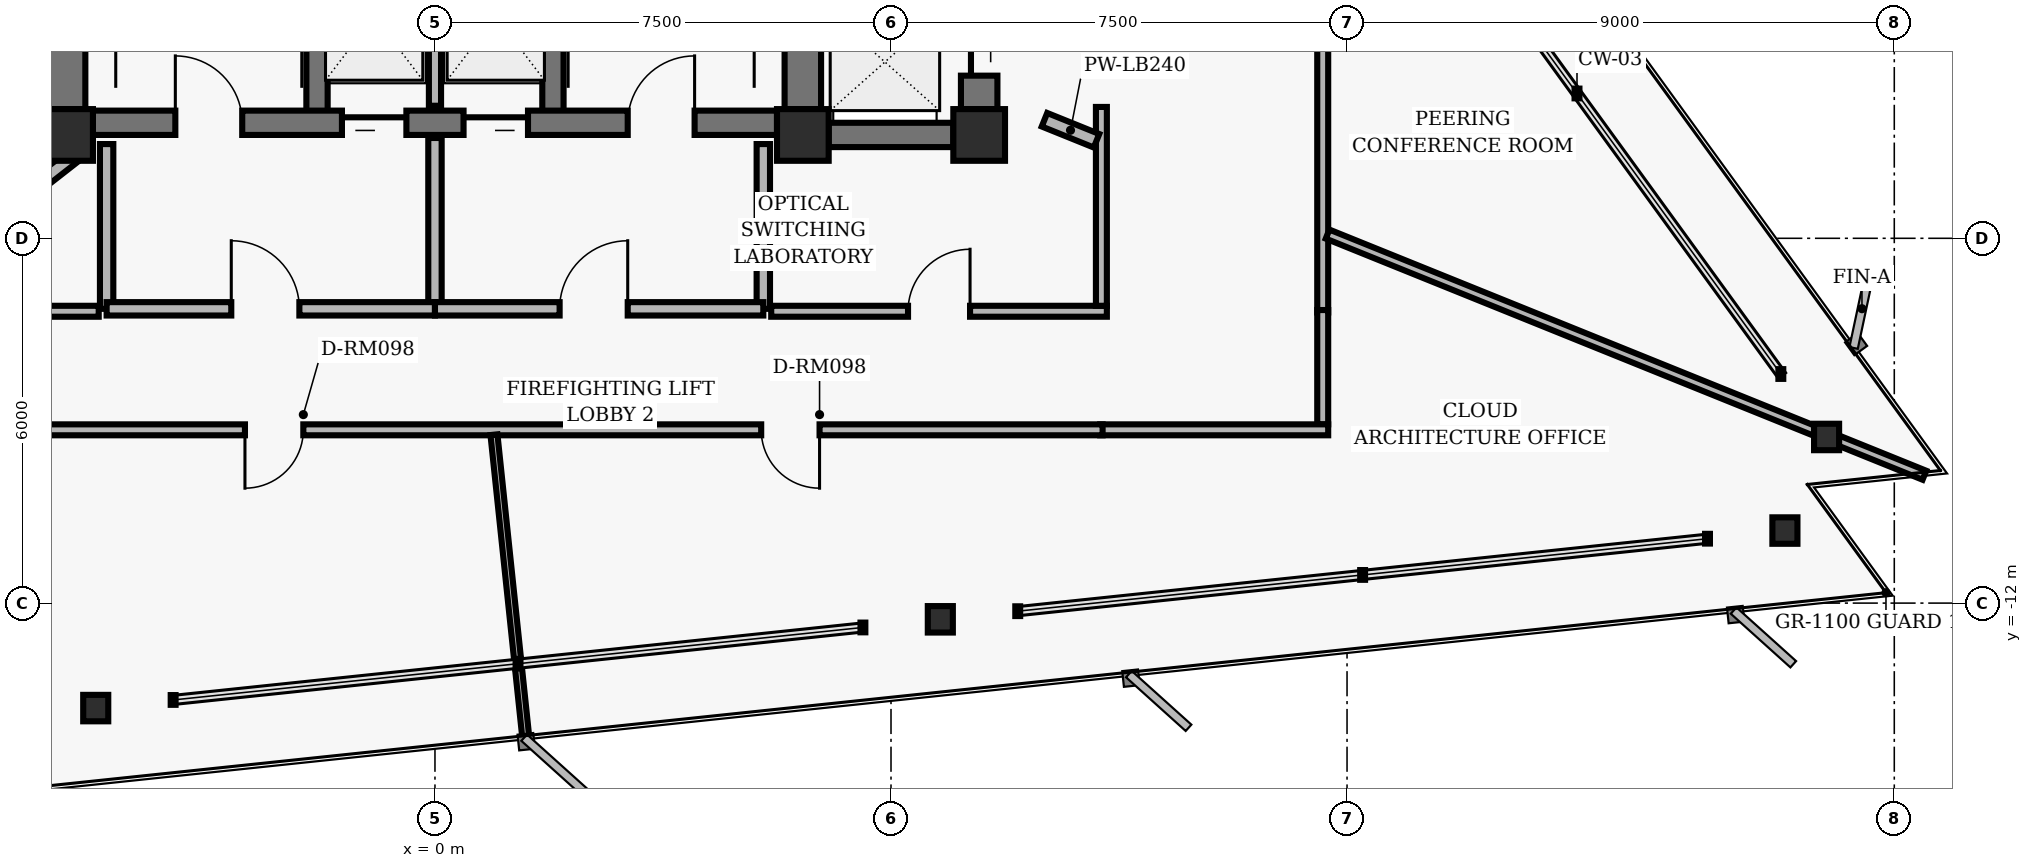
"""IFC4 building model, lengths in metres.
Left out: names, types, materials, properties, quantities, classifications, styles, units other than length and angle.
Written with IfcOpenShell. Run it as: python <this file> out.ifc"""

import sys

from ifc_helpers import new_model, si_unit, direction, frame, frame_2d, origin, origin_2d, place, context, subcontext, project, spatial, rectangle, hollow_rectangle, i_section, extrude, element, fill, save


model = new_model("IFC4")
c1 = context("Model", 3, precision=1e-05, world=origin(), true_north=direction((0.0, 1.0)))
c2 = subcontext(c1, "Body", "Model", "MODEL_VIEW")
j1 = project(units=[si_unit("LENGTHUNIT", "METRE"), si_unit("PLANEANGLEUNIT", "RADIAN")], contexts=[c1])
p1 = place(None, origin())
s1 = spatial("IfcSite", under=j1, at=p1, CompositionType="ELEMENT")
p2 = place(p1, origin())
s2 = spatial("IfcBuilding", under=s1, at=p2, CompositionType="ELEMENT")
p3 = place(p2, frame((0.0, 0.0, 107.68)))
s3 = spatial("IfcBuildingStorey", under=s2, at=p3, CompositionType="ELEMENT", Elevation=107.68)
for number, where, z_axis, x_axis in (
    (1, (-6.05, -4.3, 0.0), (0.0, 0.0, 1.0), (1.0, 0.0, 0.0)),
    (2, (6.05, -4.3, 0.0), (0.0, 0.0, 1.0), (1.0, 0.0, 0.0)),
    (3, (8.95, -4.3, 0.0), (0.0, 0.0, 1.0), (1.0, 0.0, 0.0)),
):
    element("IfcColumn", number, at=place(p3, frame(where, z_axis=z_axis, x_axis=x_axis)), inside=s3, PredefinedType="COLUMN", context=c2, shape_type="SweptSolid", body=[
        extrude(hollow_rectangle(XDim=0.85, YDim=0.85, WallThickness=0.055, InnerFilletRadius=0.02, OuterFilletRadius=0.04, at=origin_2d()), origin(), (0.0, 0.0, 1.0), 3.04),
    ])
for number, where, z_axis, x_axis in (
    (4, (-6.05, -3.875, 0.0), (0.0, 0.0, 1.0), (0.0, 1.0, 0.0)),
    (5, (6.05, -3.875, 0.0), (0.0, 0.0, 1.0), (0.0, 1.0, 0.0)),
):
    element("IfcWall", number, at=place(p3, frame(where, z_axis=z_axis, x_axis=x_axis)), inside=s3, PredefinedType="SHEAR", context=c2, shape_type="SweptSolid", body=[
        extrude(rectangle(XDim=3.45, YDim=0.6, at=frame_2d((1.725, 0.0))), origin(), (0.0, 0.0, 1.0), 2.788),
    ])
for number, where, z_axis, x_axis in (
    (6, (-1.94, -4.1, 0.0), (0.0, 0.0, 1.0), (0.0, 1.0, 0.0)),
    (7, (1.94, -4.1, 0.0), (0.0, 0.0, 1.0), (0.0, 1.0, 0.0)),
):
    element("IfcWall", number, at=place(p3, frame(where, z_axis=z_axis, x_axis=x_axis)), inside=s3, PredefinedType="SHEAR", context=c2, shape_type="SweptSolid", body=[
        extrude(rectangle(XDim=8.2, YDim=0.35, at=frame_2d((4.1, 0.0))), origin(), (0.0, 0.0, 1.0), 2.788),
    ])
p4 = place(p3, frame((-5.625, -4.1, 0.0), z_axis=(0.0, 0.0, 1.0), x_axis=(1.0, 0.0, 0.0)))
e8 = element("IfcWall", 8, at=p4, inside=s3, PredefinedType="SHEAR", context=c2, shape_type="SweptSolid", body=[
    extrude(rectangle(XDim=11.25, YDim=0.4, at=frame_2d((5.625, 0.0))), origin(), (0.0, 0.0, 1.0), 2.788),
])
p5 = place(p4, frame((1.355, 0.0, 0.0)))
e9 = element("IfcOpeningElement", 9, at=p5, cuts=e8, PredefinedType="OPENING", context=c2, shape_type="SweptSolid", body=[
    extrude(rectangle(XDim=1.1, YDim=2.04, at=frame_2d((0.55, 1.02))), frame((0.0, 0.21, 0.0), z_axis=(0.0, -1.0, 0.0), x_axis=(1.0, 0.0, 0.0)), (0.0, 0.0, 1.0), 0.42),
])
p6 = place(p4, frame((8.795, 0.0, 0.0)))
e10 = element("IfcOpeningElement", 10, at=p6, cuts=e8, PredefinedType="OPENING", context=c2, shape_type="SweptSolid", body=[
    extrude(rectangle(XDim=1.1, YDim=2.04, at=frame_2d((0.55, 1.02))), frame((0.0, 0.21, 0.0), z_axis=(0.0, -1.0, 0.0), x_axis=(1.0, 0.0, 0.0)), (0.0, 0.0, 1.0), 0.42),
])
p7 = place(p4, frame((4.095, 0.0, 0.0)))
e11 = element("IfcOpeningElement", 11, at=p7, cuts=e8, PredefinedType="OPENING", context=c2, shape_type="SweptSolid", body=[
    extrude(rectangle(XDim=1.06, YDim=2.04, at=frame_2d((0.53, 1.02))), frame((0.0, 0.21, 0.0), z_axis=(0.0, -1.0, 0.0), x_axis=(1.0, 0.0, 0.0)), (0.0, 0.0, 1.0), 0.42),
])
p8 = place(p4, frame((6.095, 0.0, 0.0)))
e12 = element("IfcOpeningElement", 12, at=p8, cuts=e8, PredefinedType="OPENING", context=c2, shape_type="SweptSolid", body=[
    extrude(rectangle(XDim=1.06, YDim=2.04, at=frame_2d((0.53, 1.02))), frame((0.0, 0.21, 0.0), z_axis=(0.0, -1.0, 0.0), x_axis=(1.0, 0.0, 0.0)), (0.0, 0.0, 1.0), 0.42),
])
p9 = place(p3, frame((8.95, -3.875, 0.0), z_axis=(0.0, 0.0, 1.0), x_axis=(0.0, 1.0, 0.0)))
e13 = element("IfcWall", 13, at=p9, inside=s3, PredefinedType="SHEAR", context=c2, shape_type="SweptSolid", body=[
    extrude(rectangle(XDim=7.95, YDim=0.6, at=frame_2d((3.975, 0.0))), origin(), (0.0, 0.0, 1.0), 2.788),
])
p10 = place(p9, frame((0.55, 0.0, 0.0)))
e14 = element("IfcOpeningElement", 14, at=p10, cuts=e13, PredefinedType="OPENING", context=c2, shape_type="SweptSolid", body=[
    extrude(rectangle(XDim=1.06, YDim=2.04, at=frame_2d((0.53, 1.02))), frame((0.0, 0.31, 0.0), z_axis=(0.0, -1.0, 0.0), x_axis=(1.0, 0.0, 0.0)), (0.0, 0.0, 1.0), 0.62),
])
p11 = place(p9, frame((3.445, 0.0, 0.0)))
e15 = element("IfcOpeningElement", 15, at=p11, cuts=e13, PredefinedType="OPENING", context=c2, shape_type="SweptSolid", body=[
    extrude(rectangle(XDim=1.06, YDim=2.04, at=frame_2d((0.53, 1.02))), frame((0.0, 0.31, 0.0), z_axis=(0.0, -1.0, 0.0), x_axis=(1.0, 0.0, 0.0)), (0.0, 0.0, 1.0), 0.62),
])
p12 = place(p9, frame((6.33, 0.0, 0.0)))
e16 = element("IfcOpeningElement", 16, at=p12, cuts=e13, PredefinedType="OPENING", context=c2, shape_type="SweptSolid", body=[
    extrude(rectangle(XDim=1.06, YDim=2.04, at=frame_2d((0.53, 1.02))), frame((0.0, 0.31, 0.0), z_axis=(0.0, -1.0, 0.0), x_axis=(1.0, 0.0, 0.0)), (0.0, 0.0, 1.0), 0.62),
])
p13 = place(p3, frame((6.475, -4.3, 0.0), z_axis=(0.0, 0.0, 1.0), x_axis=(1.0, 0.0, 0.0)))
e17 = element("IfcWall", 17, at=p13, inside=s3, PredefinedType="SHEAR", context=c2, shape_type="SweptSolid", body=[
    extrude(rectangle(XDim=2.05, YDim=0.4, at=frame_2d((1.025, 0.0))), origin(), (0.0, 0.0, 1.0), 2.788),
])
for number, where, z_axis, x_axis in (
    (18, (22.887, -9.268, 0.0), (0.0, 0.0, 1.0), (1.0, 0.0, 0.0)),
    (19, (-5.579, -13.727, 0.0), (0.0, 0.0, 1.0), (1.0, 0.0, 0.0)),
    (20, (8.311, -12.267, 0.0), (0.0, 0.0, 1.0), (1.0, 0.0, 0.0)),
    (21, (22.201, -10.807, 0.0), (0.0, 0.0, 1.0), (1.0, 0.0, 0.0)),
):
    element("IfcColumn", number, at=place(p3, frame(where, z_axis=z_axis, x_axis=x_axis)), inside=s3, PredefinedType="COLUMN", context=c2, shape_type="SweptSolid", body=[
        extrude(i_section(OverallWidth=0.412, OverallDepth=0.435, WebThickness=0.036, FlangeThickness=0.057, FilletRadius=0.022, at=origin_2d()), origin(), (0.0, 0.0, 1.0), 3.04),
    ])
p14 = place(p3, frame((0.0, -3.82, 0.0), z_axis=(0.0, 0.0, 1.0), x_axis=(0.0, 1.0, 0.0)))
e22 = element("IfcWall", 22, at=p14, inside=s3, PredefinedType="PARTITIONING", context=c2, shape_type="SweptSolid", body=[
    extrude(rectangle(XDim=2.67, YDim=0.2, at=frame_2d((1.335, 0.0))), origin(), (0.0, 0.0, 1.0), 2.763),
])
for number, where, z_axis, x_axis in (
    (23, (-5.4, -7.16, 0.0), (0.0, 0.0, 1.0), (0.0, 1.0, 0.0)),
    (24, (5.4, -7.16, 0.0), (0.0, 0.0, 1.0), (0.0, 1.0, 0.0)),
):
    element("IfcWall", number, at=place(p3, frame(where, z_axis=z_axis, x_axis=x_axis)), inside=s3, PredefinedType="PARTITIONING", context=c2, shape_type="SweptSolid", body=[
        extrude(rectangle(XDim=2.71, YDim=0.22, at=frame_2d((1.355, 0.0))), origin(), (0.0, 0.0, 1.0), 2.763),
    ])
p15 = place(p3, frame((0.0, -7.16, 0.0), z_axis=(0.0, 0.0, 1.0), x_axis=(0.0, 1.0, 0.0)))
e25 = element("IfcWall", 25, at=p15, inside=s3, PredefinedType="PARTITIONING", context=c2, shape_type="SweptSolid", body=[
    extrude(rectangle(XDim=2.81, YDim=0.22, at=frame_2d((1.405, 0.0))), origin(), (0.0, 0.0, 1.0), 2.763),
])
p16 = place(p3, frame((-5.4, -7.16, 0.0), z_axis=(0.0, 0.0, 1.0), x_axis=(1.0, 0.0, 0.0)))
e26 = element("IfcWall", 26, at=p16, inside=s3, PredefinedType="PARTITIONING", context=c2, shape_type="SweptSolid", body=[
    extrude(rectangle(XDim=5.4, YDim=0.22, at=frame_2d((2.7, 0.0))), origin(), (0.0, 0.0, 1.0), 2.33),
])
p17 = place(p16, frame((2.05, 0.0, 0.0)))
e27 = element("IfcOpeningElement", 27, at=p17, cuts=e26, PredefinedType="OPENING", context=c2, shape_type="SweptSolid", body=[
    extrude(rectangle(XDim=1.12, YDim=2.02, at=frame_2d((0.56, 1.01))), frame((0.0, 0.12, 0.0), z_axis=(0.0, -1.0, 0.0), x_axis=(1.0, 0.0, 0.0)), (0.0, 0.0, 1.0), 0.24),
])
p18 = place(p3, frame((0.0, -7.16, 0.0), z_axis=(0.0, 0.0, 1.0), x_axis=(1.0, 0.0, 0.0)))
e28 = element("IfcWall", 28, at=p18, inside=s3, PredefinedType="PARTITIONING", context=c2, shape_type="SweptSolid", body=[
    extrude(rectangle(XDim=5.4, YDim=0.22, at=frame_2d((2.7, 0.0))), origin(), (0.0, 0.0, 1.0), 2.33),
])
p19 = place(p18, frame((2.05, 0.0, 0.0)))
e29 = element("IfcOpeningElement", 29, at=p19, cuts=e28, PredefinedType="OPENING", context=c2, shape_type="SweptSolid", body=[
    extrude(rectangle(XDim=1.12, YDim=2.02, at=frame_2d((0.56, 1.01))), frame((0.0, 0.12, 0.0), z_axis=(0.0, -1.0, 0.0), x_axis=(1.0, 0.0, 0.0)), (0.0, 0.0, 1.0), 0.24),
])
p20 = place(p3, frame((14.6, 3.018, 0.0), z_axis=(0.0, 0.0, 1.0), x_axis=(0.0, -1.0, 0.0)))
e30 = element("IfcWall", 30, at=p20, inside=s3, PredefinedType="PARTITIONING", context=c2, shape_type="SweptSolid", body=[
    extrude(rectangle(XDim=10.238, YDim=0.18, at=frame_2d((5.119, 0.0))), origin(), (0.0, 0.0, 1.0), 2.763),
])
p21 = place(p20, frame((4.124, 0.0, 0.0)))
e31 = element("IfcOpeningElement", 31, at=p21, cuts=e30, PredefinedType="OPENING", context=c2, shape_type="SweptSolid", body=[
    extrude(rectangle(XDim=0.96, YDim=2.02, at=frame_2d((0.48, 1.01))), frame((0.0, 0.1, 0.0), z_axis=(0.0, -1.0, 0.0), x_axis=(1.0, 0.0, 0.0)), (0.0, 0.0, 1.0), 0.2),
])
p22 = place(p3, frame((14.6, -7.18, 0.0), z_axis=(0.0, 0.0, 1.0), x_axis=(0.0, -1.0, 0.0)))
e32 = element("IfcWall", 32, at=p22, inside=s3, PredefinedType="PARTITIONING", context=c2, shape_type="SweptSolid", body=[
    extrude(rectangle(XDim=1.88, YDim=0.18, at=frame_2d((0.94, 0.0))), origin(), (0.0, 0.0, 1.0), 2.763),
])
p23 = place(p3, frame((14.69, -9.15, 0.0), z_axis=(0.0, 0.0, 1.0), x_axis=(-1.0, 0.0, 0.0)))
e33 = element("IfcWall", 33, at=p23, inside=s3, PredefinedType="PARTITIONING", context=c2, shape_type="SweptSolid", body=[
    extrude(rectangle(XDim=3.75, YDim=0.18, at=frame_2d((1.875, 0.0))), origin(), (0.0, 0.0, 1.0), 2.33),
])
p24 = place(p3, frame((10.98, -9.15, 0.0), z_axis=(0.0, 0.0, 1.0), x_axis=(-1.0, 0.0, 0.0)))
e34 = element("IfcWall", 34, at=p24, inside=s3, PredefinedType="PARTITIONING", context=c2, shape_type="SweptSolid", body=[
    extrude(rectangle(XDim=17.5, YDim=0.18, at=frame_2d((8.75, 0.0))), origin(), (0.0, 0.0, 1.0), 2.33),
])
p25 = place(p24, frame((13.145, 0.0, 0.0)))
e35 = element("IfcOpeningElement", 35, at=p25, cuts=e34, PredefinedType="OPENING", context=c2, shape_type="SweptSolid", body=[
    extrude(rectangle(XDim=0.96, YDim=2.02, at=frame_2d((0.48, 1.01))), frame((0.0, 0.1, 0.0), z_axis=(0.0, -1.0, 0.0), x_axis=(1.0, 0.0, 0.0)), (0.0, 0.0, 1.0), 0.2),
])
p26 = place(p24, frame((4.655, 0.0, 0.0)))
e36 = element("IfcOpeningElement", 36, at=p26, cuts=e34, PredefinedType="OPENING", context=c2, shape_type="SweptSolid", body=[
    extrude(rectangle(XDim=0.96, YDim=2.02, at=frame_2d((0.48, 1.01))), frame((0.0, 0.1, 0.0), z_axis=(0.0, -1.0, 0.0), x_axis=(1.0, 0.0, 0.0)), (0.0, 0.0, 1.0), 0.2),
])
p27 = place(p3, frame((5.53, -7.2, 0.0), z_axis=(0.0, 0.0, 1.0), x_axis=(1.0, 0.0, 0.0)))
e37 = element("IfcWall", 37, at=p27, inside=s3, PredefinedType="PARTITIONING", context=c2, shape_type="SweptSolid", body=[
    extrude(rectangle(XDim=5.52, YDim=0.18, at=frame_2d((2.76, 0.0))), origin(), (0.0, 0.0, 1.0), 2.33),
])
p28 = place(p27, frame((2.25, 0.0, 0.0)))
e38 = element("IfcOpeningElement", 38, at=p28, cuts=e37, PredefinedType="OPENING", context=c2, shape_type="SweptSolid", body=[
    extrude(rectangle(XDim=1.02, YDim=2.02, at=frame_2d((0.51, 1.01))), frame((0.0, 0.1, 0.0), z_axis=(0.0, -1.0, 0.0), x_axis=(1.0, 0.0, 0.0)), (0.0, 0.0, 1.0), 0.2),
])
p29 = place(p3, frame((10.96, -7.11, 0.0), z_axis=(0.0, 0.0, 1.0), x_axis=(0.0, 1.0, 0.0)))
e39 = element("IfcWall", 39, at=p29, inside=s3, PredefinedType="PARTITIONING", context=c2, shape_type="SweptSolid", body=[
    extrude(rectangle(XDim=3.271, YDim=0.18, at=frame_2d((1.635, 0.0))), origin(), (0.0, 0.0, 1.0), 2.763),
])
p30 = place(p3, frame((-6.59, -7.2, 0.0), z_axis=(0.0, 0.0, 1.0), x_axis=(1.0, 0.0, 0.0)))
e40 = element("IfcWall", 40, at=p30, inside=s3, PredefinedType="PARTITIONING", context=c2, shape_type="SweptSolid", body=[
    extrude(rectangle(XDim=1.06, YDim=0.18, at=frame_2d((0.53, 0.0))), origin(), (0.0, 0.0, 1.0), 2.33),
])
p31 = place(p3, frame((-5.836, -4.56, 0.0), z_axis=(0.0, 0.0, 1.0), x_axis=(-0.788054366409, -0.615605649408, 0.0)))
e41 = element("IfcWall", 41, at=p31, inside=s3, PredefinedType="PARTITIONING", context=c2, shape_type="SweptSolid", body=[
    extrude(rectangle(XDim=0.74, YDim=0.24, at=frame_2d((0.37, 0.0))), origin(), (0.0, 0.0, 1.0), 2.132),
])
p32 = place(p3, frame((0.97, -9.23, 0.0), z_axis=(0.0, 0.0, 1.0), x_axis=(0.104502779655, -0.994524594489, 0.0)))
e42 = element("IfcWall", 42, at=p32, inside=s3, PredefinedType="MOVABLE", context=c2, shape_type="SweptSolid", body=[
    extrude(rectangle(XDim=5.028, YDim=0.115, at=frame_2d((2.514, 0.0))), origin(), (0.0, 0.0, 1.0), 2.763),
])
p33 = place(p3, frame((10.024, -4.05, 0.0), z_axis=(0.0, 0.0, 1.0), x_axis=(0.927194137639, -0.374581140912, 0.0)))
e43 = element("IfcWall", 43, at=p33, inside=s3, PredefinedType="PARTITIONING", context=c2, shape_type="SweptSolid", body=[
    extrude(rectangle(XDim=0.923, YDim=0.24, at=frame_2d((0.461, 0.0))), origin(), (0.0, 0.0, 1.0), 2.763),
])
p34 = place(p3, frame((14.68, -5.931, 0.0), z_axis=(0.0, 0.0, 1.0), x_axis=(0.927187622353, -0.374597267682, 0.0)))
e44 = element("IfcWall", 44, at=p34, inside=s3, PredefinedType="PARTITIONING", context=c2, shape_type="SweptSolid", body=[
    extrude(rectangle(XDim=10.586, YDim=0.16, at=frame_2d((5.293, 0.0))), origin(), (0.0, 0.0, 1.0), 2.132),
])
p35 = place(p5, origin())
e45 = element("IfcDoor", 45, at=p35, inside=s3, OperationType="SINGLE_SWING_LEFT", PredefinedType="DOOR", context=c2, shape_type="SweptSolid", body=[
    extrude(rectangle(XDim=1.1, YDim=2.04, at=frame_2d((0.55, 1.02))), frame((0.0, 0.025, 0.0), z_axis=(0.0, -1.0, 0.0), x_axis=(1.0, 0.0, 0.0)), (0.0, 0.0, 1.0), 0.05),
])
fill(e9, e45)
p36 = place(p6, origin())
e46 = element("IfcDoor", 46, at=p36, inside=s3, OperationType="SINGLE_SWING_RIGHT", PredefinedType="DOOR", context=c2, shape_type="SweptSolid", body=[
    extrude(rectangle(XDim=1.1, YDim=2.04, at=frame_2d((0.55, 1.02))), frame((0.0, 0.025, 0.0), z_axis=(0.0, -1.0, 0.0), x_axis=(1.0, 0.0, 0.0)), (0.0, 0.0, 1.0), 0.05),
])
fill(e10, e46)
p37 = place(p7, origin())
e47 = element("IfcDoor", 47, at=p37, inside=s3, OperationType="SLIDING_TO_LEFT", PredefinedType="DOOR", context=c2, shape_type="SweptSolid", body=[
    extrude(rectangle(XDim=1.06, YDim=2.04, at=frame_2d((0.53, 1.02))), frame((0.0, 0.025, 0.0), z_axis=(0.0, -1.0, 0.0), x_axis=(1.0, 0.0, 0.0)), (0.0, 0.0, 1.0), 0.05),
])
fill(e11, e47)
p38 = place(p8, origin())
e48 = element("IfcDoor", 48, at=p38, inside=s3, OperationType="SLIDING_TO_RIGHT", PredefinedType="DOOR", context=c2, shape_type="SweptSolid", body=[
    extrude(rectangle(XDim=1.06, YDim=2.04, at=frame_2d((0.53, 1.02))), frame((0.0, 0.025, 0.0), z_axis=(0.0, -1.0, 0.0), x_axis=(1.0, 0.0, 0.0)), (0.0, 0.0, 1.0), 0.05),
])
fill(e12, e48)
p39 = place(p17, origin())
e49 = element("IfcDoor", 49, at=p39, inside=s3, OperationType="SINGLE_SWING_LEFT", PredefinedType="DOOR", context=c2, shape_type="SweptSolid", body=[
    extrude(rectangle(XDim=1.12, YDim=2.02, at=frame_2d((0.56, 1.01))), frame((0.0, 0.025, 0.0), z_axis=(0.0, -1.0, 0.0), x_axis=(1.0, 0.0, 0.0)), (0.0, 0.0, 1.0), 0.05),
])
fill(e27, e49)
p40 = place(p19, origin())
e50 = element("IfcDoor", 50, at=p40, inside=s3, OperationType="SINGLE_SWING_RIGHT", PredefinedType="DOOR", context=c2, shape_type="SweptSolid", body=[
    extrude(rectangle(XDim=1.12, YDim=2.02, at=frame_2d((0.56, 1.01))), frame((0.0, 0.025, 0.0), z_axis=(0.0, -1.0, 0.0), x_axis=(1.0, 0.0, 0.0)), (0.0, 0.0, 1.0), 0.05),
])
fill(e29, e50)
p41 = place(p10, origin())
e51 = element("IfcDoor", 51, at=p41, inside=s3, OperationType="SLIDING_TO_LEFT", PredefinedType="DOOR", context=c2, shape_type="SweptSolid", body=[
    extrude(rectangle(XDim=1.06, YDim=2.04, at=frame_2d((0.53, 1.02))), frame((0.0, 0.025, 0.0), z_axis=(0.0, -1.0, 0.0), x_axis=(1.0, 0.0, 0.0)), (0.0, 0.0, 1.0), 0.05),
])
fill(e14, e51)
p42 = place(p25, origin())
e52 = element("IfcDoor", 52, at=p42, inside=s3, OperationType="SINGLE_SWING_RIGHT", PredefinedType="DOOR", context=c2, shape_type="SweptSolid", body=[
    extrude(rectangle(XDim=0.96, YDim=2.02, at=frame_2d((0.48, 1.01))), frame((0.0, 0.025, 0.0), z_axis=(0.0, -1.0, 0.0), x_axis=(1.0, 0.0, 0.0)), (0.0, 0.0, 1.0), 0.05),
])
fill(e35, e52)
p43 = place(p26, origin())
e53 = element("IfcDoor", 53, at=p43, inside=s3, OperationType="SINGLE_SWING_LEFT", PredefinedType="DOOR", context=c2, shape_type="SweptSolid", body=[
    extrude(rectangle(XDim=0.96, YDim=2.02, at=frame_2d((0.48, 1.01))), frame((0.0, 0.025, 0.0), z_axis=(0.0, -1.0, 0.0), x_axis=(1.0, 0.0, 0.0)), (0.0, 0.0, 1.0), 0.05),
])
fill(e36, e53)
p44 = place(p28, origin())
e54 = element("IfcDoor", 54, at=p44, inside=s3, OperationType="SINGLE_SWING_RIGHT", PredefinedType="DOOR", context=c2, shape_type="SweptSolid", body=[
    extrude(rectangle(XDim=1.02, YDim=2.02, at=frame_2d((0.51, 1.01))), frame((0.0, 0.025, 0.0), z_axis=(0.0, -1.0, 0.0), x_axis=(1.0, 0.0, 0.0)), (0.0, 0.0, 1.0), 0.05),
])
fill(e38, e54)
save(model, sys.argv[1])
